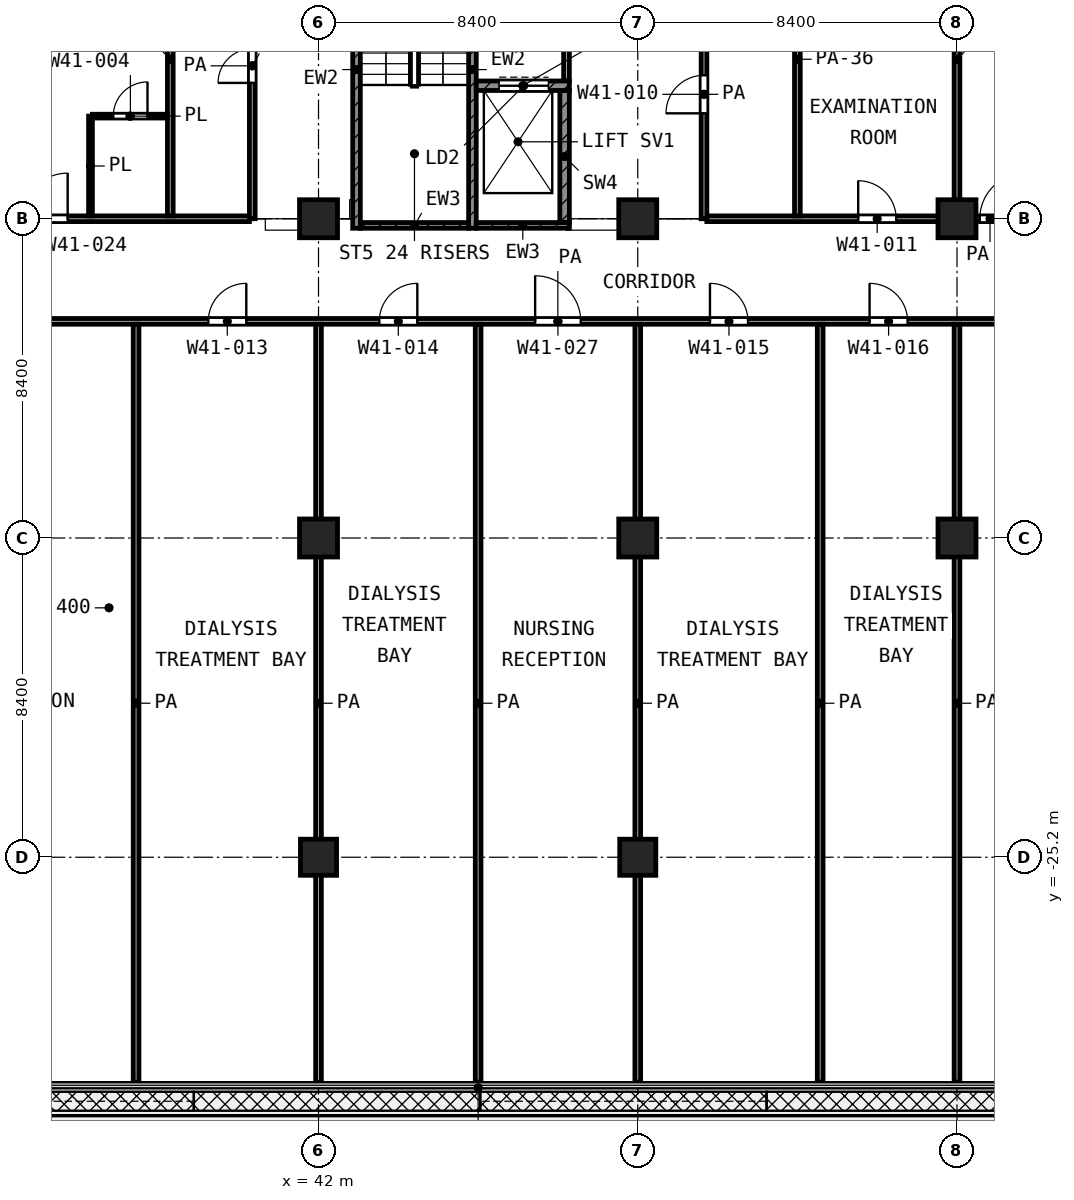
"""IFC4 building model, lengths in metres.
Left out: names, types, materials, properties, quantities, classifications, styles, units other than length and angle.
Written with IfcOpenShell. Run it as: python <this file> out.ifc"""

import sys

from ifc_helpers import new_model, si_unit, direction, frame, frame_2d, origin, origin_2d, place, context, subcontext, project, spatial, rectangle, extrude, element, fill, save


model = new_model("IFC4")
c1 = context("Model", 3, precision=1e-05, world=origin(), true_north=direction((0.0, 1.0)))
c2 = subcontext(c1, "Body", "Model", "MODEL_VIEW")
j1 = project(units=[si_unit("LENGTHUNIT", "METRE"), si_unit("PLANEANGLEUNIT", "RADIAN")], contexts=[c1])
p1 = place(None, origin())
s1 = spatial("IfcSite", under=j1, at=p1, CompositionType="ELEMENT")
p2 = place(p1, origin())
s2 = spatial("IfcBuilding", under=s1, at=p2, CompositionType="ELEMENT")
p3 = place(p2, frame((0.0, 0.0, 200.4)))
s3 = spatial("IfcBuildingStorey", under=s2, at=p3, CompositionType="ELEMENT", Elevation=200.4)
for number, where, z_axis, x_axis in (
    (1, (42.0, -8.4, 0.0), (0.0, 0.0, 1.0), (1.0, 0.0, 0.0)),
    (2, (50.4, -8.4, 0.0), (0.0, 0.0, 1.0), (1.0, 0.0, 0.0)),
    (3, (58.8, -8.4, 0.0), (0.0, 0.0, 1.0), (1.0, 0.0, 0.0)),
    (4, (42.0, -16.8, 0.0), (0.0, 0.0, 1.0), (1.0, 0.0, 0.0)),
    (5, (50.4, -16.8, 0.0), (0.0, 0.0, 1.0), (1.0, 0.0, 0.0)),
    (6, (58.8, -16.8, 0.0), (0.0, 0.0, 1.0), (1.0, 0.0, 0.0)),
):
    element("IfcColumn", number, at=place(p3, frame(where, z_axis=z_axis, x_axis=x_axis)), inside=s3, PredefinedType="COLUMN", context=c2, shape_type="SweptSolid", body=[
        extrude(rectangle(XDim=1.0, YDim=1.0, at=origin_2d()), origin(), (0.0, 0.0, 1.0), 4.2),
    ])
for number, where, z_axis, x_axis in (
    (7, (42.0, -25.2, 0.0), (0.0, 0.0, 1.0), (1.0, 0.0, 0.0)),
    (8, (50.4, -25.2, 0.0), (0.0, 0.0, 1.0), (1.0, 0.0, 0.0)),
):
    element("IfcColumn", number, at=place(p3, frame(where, z_axis=z_axis, x_axis=x_axis)), inside=s3, PredefinedType="COLUMN", context=c2, shape_type="SweptSolid", body=[
        extrude(rectangle(XDim=0.95, YDim=0.95, at=origin_2d()), origin(), (0.0, 0.0, 1.0), 4.2),
    ])
p4 = place(p3, frame((43.0, -8.65, 0.0), z_axis=(0.0, 0.0, 1.0), x_axis=(0.0, 1.0, 0.0)))
e9 = element("IfcWall", 9, at=p4, inside=s3, PredefinedType="SHEAR", context=c2, shape_type="SweptSolid", body=[
    extrude(rectangle(XDim=8.35, YDim=0.2, at=frame_2d((4.175, 0.0))), origin(), (0.0, 0.0, 1.0), 3.6),
])
p5 = place(p4, frame((7.0, 0.0, 0.0)))
e10 = element("IfcOpeningElement", 10, at=p5, cuts=e9, PredefinedType="OPENING", context=c2, shape_type="SweptSolid", body=[
    extrude(rectangle(XDim=1.1, YDim=2.1, at=frame_2d((0.55, 1.05))), frame((0.0, 0.11, 0.0), z_axis=(0.0, -1.0, 0.0), x_axis=(1.0, 0.0, 0.0)), (0.0, 0.0, 1.0), 0.22),
])
p6 = place(p3, frame((46.05, -8.65, 0.0), z_axis=(0.0, 0.0, 1.0), x_axis=(0.0, 1.0, 0.0)))
e11 = element("IfcWall", 11, at=p6, inside=s3, PredefinedType="SHEAR", context=c2, shape_type="SweptSolid", body=[
    extrude(rectangle(XDim=8.35, YDim=0.2, at=frame_2d((4.175, 0.0))), origin(), (0.0, 0.0, 1.0), 3.6),
])
p7 = place(p6, frame((7.0, 0.0, 0.0)))
e12 = element("IfcOpeningElement", 12, at=p7, cuts=e11, PredefinedType="OPENING", context=c2, shape_type="SweptSolid", body=[
    extrude(rectangle(XDim=1.1, YDim=2.1, at=frame_2d((0.55, 1.05))), frame((0.0, 0.11, 0.0), z_axis=(0.0, -1.0, 0.0), x_axis=(1.0, 0.0, 0.0)), (0.0, 0.0, 1.0), 0.22),
])
p8 = place(p3, frame((43.1, -8.575, 0.0), z_axis=(0.0, 0.0, 1.0), x_axis=(1.0, 0.0, 0.0)))
e13 = element("IfcWall", 13, at=p8, inside=s3, PredefinedType="SHEAR", context=c2, shape_type="SweptSolid", body=[
    extrude(rectangle(XDim=2.85, YDim=0.15, at=frame_2d((1.425, 0.0))), origin(), (0.0, 0.0, 1.0), 3.6),
])
p9 = place(p3, frame((46.15, -8.575, 0.0), z_axis=(0.0, 0.0, 1.0), x_axis=(1.0, 0.0, 0.0)))
e14 = element("IfcWall", 14, at=p9, inside=s3, PredefinedType="SHEAR", context=c2, shape_type="SweptSolid", body=[
    extrude(rectangle(XDim=2.45, YDim=0.15, at=frame_2d((1.225, 0.0))), origin(), (0.0, 0.0, 1.0), 3.6),
])
p10 = place(p3, frame((46.15, -4.9, 0.0), z_axis=(0.0, 0.0, 1.0), x_axis=(1.0, 0.0, 0.0)))
e15 = element("IfcWall", 15, at=p10, inside=s3, PredefinedType="SHEAR", context=c2, shape_type="SweptSolid", body=[
    extrude(rectangle(XDim=2.45, YDim=0.25, at=frame_2d((1.225, 0.0))), origin(), (0.0, 0.0, 1.0), 3.6),
])
p11 = place(p10, frame((0.6, 0.0, 0.0)))
e16 = element("IfcOpeningElement", 16, at=p11, cuts=e15, PredefinedType="OPENING", context=c2, shape_type="SweptSolid", body=[
    extrude(rectangle(XDim=1.3, YDim=2.1, at=frame_2d((0.65, 1.05))), frame((0.0, 0.135, 0.0), z_axis=(0.0, -1.0, 0.0), x_axis=(1.0, 0.0, 0.0)), (0.0, 0.0, 1.0), 0.27),
])
p12 = place(p3, frame((48.475, -8.5, 0.0), z_axis=(0.0, 0.0, 1.0), x_axis=(0.0, 1.0, 0.0)))
e17 = element("IfcWall", 17, at=p12, inside=s3, PredefinedType="SHEAR", context=c2, shape_type="SweptSolid", body=[
    extrude(rectangle(XDim=3.475, YDim=0.25, at=frame_2d((1.738, 0.0))), origin(), (0.0, 0.0, 1.0), 3.6),
])
p13 = place(p3, frame((48.525, -4.775, 0.0), z_axis=(0.0, 0.0, 1.0), x_axis=(0.0, 1.0, 0.0)))
e18 = element("IfcWall", 18, at=p13, inside=s3, PredefinedType="PARTITIONING", context=c2, shape_type="SweptSolid", body=[
    extrude(rectangle(XDim=4.325, YDim=0.15, at=frame_2d((2.163, 0.0))), origin(), (0.0, 0.0, 1.0), 3.6),
])
p14 = place(p13, frame((1.625, 0.0, 0.0)))
e19 = element("IfcOpeningElement", 19, at=p14, cuts=e18, PredefinedType="OPENING", context=c2, shape_type="SweptSolid", body=[
    extrude(rectangle(XDim=1.1, YDim=2.1, at=frame_2d((0.55, 1.05))), frame((0.0, 0.085, 0.0), z_axis=(0.0, -1.0, 0.0), x_axis=(1.0, 0.0, 0.0)), (0.0, 0.0, 1.0), 0.17),
])
p15 = place(p3, frame((36.05, -5.7, 0.0), z_axis=(0.0, 0.0, 1.0), x_axis=(1.0, 0.0, 0.0)))
e20 = element("IfcWall", 20, at=p15, inside=s3, PredefinedType="PARTITIONING", context=c2, shape_type="SweptSolid", body=[
    extrude(rectangle(XDim=1.975, YDim=0.1, at=frame_2d((0.987, 0.0))), origin(), (0.0, 0.0, 1.0), 3.6),
])
p16 = place(p15, frame((0.55, 0.0, 0.0)))
e21 = element("IfcOpeningElement", 21, at=p16, cuts=e20, PredefinedType="OPENING", context=c2, shape_type="SweptSolid", body=[
    extrude(rectangle(XDim=0.9, YDim=2.1, at=frame_2d((0.45, 1.05))), frame((0.0, 0.06, 0.0), z_axis=(0.0, -1.0, 0.0), x_axis=(1.0, 0.0, 0.0)), (0.0, 0.0, 1.0), 0.12),
])
p17 = place(p3, frame((36.0, -8.325, 0.0), z_axis=(0.0, 0.0, 1.0), x_axis=(0.0, 1.0, 0.0)))
e22 = element("IfcWall", 22, at=p17, inside=s3, PredefinedType="PARTITIONING", context=c2, shape_type="SweptSolid", body=[
    extrude(rectangle(XDim=2.625, YDim=0.1, at=frame_2d((1.312, 0.0))), origin(), (0.0, 0.0, 1.0), 3.6),
])
p18 = place(p3, frame((29.475, -11.1, 0.0), z_axis=(0.0, 0.0, 1.0), x_axis=(1.0, 0.0, 0.0)))
e23 = element("IfcWall", 23, at=p18, inside=s3, PredefinedType="PARTITIONING", context=c2, shape_type="SweptSolid", body=[
    extrude(rectangle(XDim=37.645, YDim=0.15, at=frame_2d((18.823, 0.0))), origin(), (0.0, 0.0, 1.0), 3.6),
])
p19 = place(p18, frame((3.225, 0.0, 0.0)))
e24 = element("IfcOpeningElement", 24, at=p19, cuts=e23, PredefinedType="OPENING", context=c2, shape_type="SweptSolid", body=[
    extrude(rectangle(XDim=1.2, YDim=2.1, at=frame_2d((0.6, 1.05))), frame((0.0, 0.085, 0.0), z_axis=(0.0, -1.0, 0.0), x_axis=(1.0, 0.0, 0.0)), (0.0, 0.0, 1.0), 0.17),
])
p20 = place(p18, frame((9.625, 0.0, 0.0)))
e25 = element("IfcOpeningElement", 25, at=p20, cuts=e23, PredefinedType="OPENING", context=c2, shape_type="SweptSolid", body=[
    extrude(rectangle(XDim=1.0, YDim=2.1, at=frame_2d((0.5, 1.05))), frame((0.0, 0.085, 0.0), z_axis=(0.0, -1.0, 0.0), x_axis=(1.0, 0.0, 0.0)), (0.0, 0.0, 1.0), 0.17),
])
p21 = place(p18, frame((14.125, 0.0, 0.0)))
e26 = element("IfcOpeningElement", 26, at=p21, cuts=e23, PredefinedType="OPENING", context=c2, shape_type="SweptSolid", body=[
    extrude(rectangle(XDim=1.0, YDim=2.1, at=frame_2d((0.5, 1.05))), frame((0.0, 0.085, 0.0), z_axis=(0.0, -1.0, 0.0), x_axis=(1.0, 0.0, 0.0)), (0.0, 0.0, 1.0), 0.17),
])
p22 = place(p18, frame((18.225, 0.0, 0.0)))
e27 = element("IfcOpeningElement", 27, at=p22, cuts=e23, PredefinedType="OPENING", context=c2, shape_type="SweptSolid", body=[
    extrude(rectangle(XDim=1.2, YDim=2.1, at=frame_2d((0.6, 1.05))), frame((0.0, 0.085, 0.0), z_axis=(0.0, -1.0, 0.0), x_axis=(1.0, 0.0, 0.0)), (0.0, 0.0, 1.0), 0.17),
])
p23 = place(p18, frame((22.825, 0.0, 0.0)))
e28 = element("IfcOpeningElement", 28, at=p23, cuts=e23, PredefinedType="OPENING", context=c2, shape_type="SweptSolid", body=[
    extrude(rectangle(XDim=1.0, YDim=2.1, at=frame_2d((0.5, 1.05))), frame((0.0, 0.085, 0.0), z_axis=(0.0, -1.0, 0.0), x_axis=(1.0, 0.0, 0.0)), (0.0, 0.0, 1.0), 0.17),
])
p24 = place(p18, frame((27.025, 0.0, 0.0)))
e29 = element("IfcOpeningElement", 29, at=p24, cuts=e23, PredefinedType="OPENING", context=c2, shape_type="SweptSolid", body=[
    extrude(rectangle(XDim=1.0, YDim=2.1, at=frame_2d((0.5, 1.05))), frame((0.0, 0.085, 0.0), z_axis=(0.0, -1.0, 0.0), x_axis=(1.0, 0.0, 0.0)), (0.0, 0.0, 1.0), 0.17),
])
p25 = place(p18, frame((32.775, 0.0, 0.0)))
e30 = element("IfcOpeningElement", 30, at=p25, cuts=e23, PredefinedType="OPENING", context=c2, shape_type="SweptSolid", body=[
    extrude(rectangle(XDim=1.5, YDim=2.1, at=frame_2d((0.75, 1.05))), frame((0.0, 0.085, 0.0), z_axis=(0.0, -1.0, 0.0), x_axis=(1.0, 0.0, 0.0)), (0.0, 0.0, 1.0), 0.17),
])
p26 = place(p3, frame((24.9, -8.4, 0.0), z_axis=(0.0, 0.0, 1.0), x_axis=(1.0, 0.0, 0.0)))
e31 = element("IfcWall", 31, at=p26, inside=s3, PredefinedType="PARTITIONING", context=c2, shape_type="SweptSolid", body=[
    extrude(rectangle(XDim=15.282, YDim=0.15, at=frame_2d((7.641, 0.0))), origin(), (0.0, 0.0, 1.0), 3.6),
])
p27 = place(p26, frame((1.75, 0.0, 0.0)))
e32 = element("IfcOpeningElement", 32, at=p27, cuts=e31, PredefinedType="OPENING", context=c2, shape_type="SweptSolid", body=[
    extrude(rectangle(XDim=1.0, YDim=2.1, at=frame_2d((0.5, 1.05))), frame((0.0, 0.085, 0.0), z_axis=(0.0, -1.0, 0.0), x_axis=(1.0, 0.0, 0.0)), (0.0, 0.0, 1.0), 0.17),
])
p28 = place(p26, frame((5.85, 0.0, 0.0)))
e33 = element("IfcOpeningElement", 33, at=p28, cuts=e31, PredefinedType="OPENING", context=c2, shape_type="SweptSolid", body=[
    extrude(rectangle(XDim=1.2, YDim=2.1, at=frame_2d((0.6, 1.05))), frame((0.0, 0.085, 0.0), z_axis=(0.0, -1.0, 0.0), x_axis=(1.0, 0.0, 0.0)), (0.0, 0.0, 1.0), 0.17),
])
p29 = place(p26, frame((9.3, 0.0, 0.0)))
e34 = element("IfcOpeningElement", 34, at=p29, cuts=e31, PredefinedType="OPENING", context=c2, shape_type="SweptSolid", body=[
    extrude(rectangle(XDim=1.2, YDim=2.1, at=frame_2d((0.6, 1.05))), frame((0.0, 0.085, 0.0), z_axis=(0.0, -1.0, 0.0), x_axis=(1.0, 0.0, 0.0)), (0.0, 0.0, 1.0), 0.17),
])
p30 = place(p3, frame((52.218, -8.4, 0.0), z_axis=(0.0, 0.0, 1.0), x_axis=(1.0, 0.0, 0.0)))
e35 = element("IfcWall", 35, at=p30, inside=s3, PredefinedType="PARTITIONING", context=c2, shape_type="SweptSolid", body=[
    extrude(rectangle(XDim=14.902, YDim=0.15, at=frame_2d((7.451, 0.0))), origin(), (0.0, 0.0, 1.0), 3.6),
])
p31 = place(p30, frame((3.982, 0.0, 0.0)))
e36 = element("IfcOpeningElement", 36, at=p31, cuts=e35, PredefinedType="OPENING", context=c2, shape_type="SweptSolid", body=[
    extrude(rectangle(XDim=1.0, YDim=2.1, at=frame_2d((0.5, 1.05))), frame((0.0, 0.085, 0.0), z_axis=(0.0, -1.0, 0.0), x_axis=(1.0, 0.0, 0.0)), (0.0, 0.0, 1.0), 0.17),
])
p32 = place(p30, frame((7.182, 0.0, 0.0)))
e37 = element("IfcOpeningElement", 37, at=p32, cuts=e35, PredefinedType="OPENING", context=c2, shape_type="SweptSolid", body=[
    extrude(rectangle(XDim=1.2, YDim=2.1, at=frame_2d((0.6, 1.05))), frame((0.0, 0.085, 0.0), z_axis=(0.0, -1.0, 0.0), x_axis=(1.0, 0.0, 0.0)), (0.0, 0.0, 1.0), 0.17),
])
p33 = place(p30, frame((12.682, 0.0, 0.0)))
e38 = element("IfcOpeningElement", 38, at=p33, cuts=e35, PredefinedType="OPENING", context=c2, shape_type="SweptSolid", body=[
    extrude(rectangle(XDim=1.0, YDim=2.1, at=frame_2d((0.5, 1.05))), frame((0.0, 0.085, 0.0), z_axis=(0.0, -1.0, 0.0), x_axis=(1.0, 0.0, 0.0)), (0.0, 0.0, 1.0), 0.17),
])
p34 = place(p3, frame((37.2, -31.12, 0.0), z_axis=(0.0, 0.0, 1.0), x_axis=(0.0, 1.0, 0.0)))
e39 = element("IfcWall", 39, at=p34, inside=s3, PredefinedType="PARTITIONING", context=c2, shape_type="SweptSolid", body=[
    extrude(rectangle(XDim=19.945, YDim=0.15, at=frame_2d((9.973, 0.0))), origin(), (0.0, 0.0, 1.0), 3.6),
])
p35 = place(p3, frame((38.1, -8.325, 0.0), z_axis=(0.0, 0.0, 1.0), x_axis=(0.0, 1.0, 0.0)))
e40 = element("IfcWall", 40, at=p35, inside=s3, PredefinedType="PARTITIONING", context=c2, shape_type="SweptSolid", body=[
    extrude(rectangle(XDim=8.245, YDim=0.15, at=frame_2d((4.123, 0.0))), origin(), (0.0, 0.0, 1.0), 2.7),
])
p36 = place(p3, frame((40.257, -8.4, 0.0), z_axis=(0.0, 0.0, 1.0), x_axis=(0.0, 1.0, 0.0)))
e41 = element("IfcWall", 41, at=p36, inside=s3, PredefinedType="PARTITIONING", context=c2, shape_type="SweptSolid", body=[
    extrude(rectangle(XDim=8.048, YDim=0.15, at=frame_2d((4.024, 0.0))), origin(), (0.0, 0.0, 1.0), 3.6),
])
p37 = place(p36, frame((3.574, 0.0, 0.0)))
e42 = element("IfcOpeningElement", 42, at=p37, cuts=e41, PredefinedType="OPENING", context=c2, shape_type="SweptSolid", body=[
    extrude(rectangle(XDim=0.9, YDim=2.1, at=frame_2d((0.45, 1.05))), frame((0.0, 0.085, 0.0), z_axis=(0.0, -1.0, 0.0), x_axis=(1.0, 0.0, 0.0)), (0.0, 0.0, 1.0), 0.17),
])
for number, where, z_axis, x_axis in (
    (43, (42.0, -31.12, 0.0), (0.0, 0.0, 1.0), (0.0, 1.0, 0.0)),
    (44, (46.2, -31.12, 0.0), (0.0, 0.0, 1.0), (0.0, 1.0, 0.0)),
    (45, (50.4, -31.12, 0.0), (0.0, 0.0, 1.0), (0.0, 1.0, 0.0)),
):
    element("IfcWall", number, at=place(p3, frame(where, z_axis=z_axis, x_axis=x_axis)), inside=s3, PredefinedType="PARTITIONING", context=c2, shape_type="SweptSolid", body=[
        extrude(rectangle(XDim=19.945, YDim=0.15, at=frame_2d((9.973, 0.0))), origin(), (0.0, 0.0, 1.0), 3.6),
    ])
p38 = place(p3, frame((52.143, -8.4, 0.0), z_axis=(0.0, 0.0, 1.0), x_axis=(0.0, 1.0, 0.0)))
e46 = element("IfcWall", 46, at=p38, inside=s3, PredefinedType="PARTITIONING", context=c2, shape_type="SweptSolid", body=[
    extrude(rectangle(XDim=6.549, YDim=0.15, at=frame_2d((3.274, 0.0))), origin(), (0.0, 0.0, 1.0), 3.6),
])
p39 = place(p38, frame((2.774, 0.0, 0.0)))
e47 = element("IfcOpeningElement", 47, at=p39, cuts=e46, PredefinedType="OPENING", context=c2, shape_type="SweptSolid", body=[
    extrude(rectangle(XDim=1.0, YDim=2.1, at=frame_2d((0.5, 1.05))), frame((0.0, 0.085, 0.0), z_axis=(0.0, -1.0, 0.0), x_axis=(1.0, 0.0, 0.0)), (0.0, 0.0, 1.0), 0.17),
])
p40 = place(p3, frame((54.6, -8.325, 0.0), z_axis=(0.0, 0.0, 1.0), x_axis=(0.0, 1.0, 0.0)))
e48 = element("IfcWall", 48, at=p40, inside=s3, PredefinedType="PARTITIONING", context=c2, shape_type="SweptSolid", body=[
    extrude(rectangle(XDim=8.245, YDim=0.15, at=frame_2d((4.123, 0.0))), origin(), (0.0, 0.0, 1.0), 2.7),
])
for number, where, z_axis, x_axis in (
    (49, (55.2, -31.12, 0.0), (0.0, 0.0, 1.0), (0.0, 1.0, 0.0)),
    (50, (58.8, -31.12, 0.0), (0.0, 0.0, 1.0), (0.0, 1.0, 0.0)),
):
    element("IfcWall", number, at=place(p3, frame(where, z_axis=z_axis, x_axis=x_axis)), inside=s3, PredefinedType="PARTITIONING", context=c2, shape_type="SweptSolid", body=[
        extrude(rectangle(XDim=19.945, YDim=0.15, at=frame_2d((9.973, 0.0))), origin(), (0.0, 0.0, 1.0), 3.6),
    ])
p41 = place(p3, frame((58.8, -8.325, 0.0), z_axis=(0.0, 0.0, 1.0), x_axis=(0.0, 1.0, 0.0)))
e51 = element("IfcWall", 51, at=p41, inside=s3, PredefinedType="PARTITIONING", context=c2, shape_type="SweptSolid", body=[
    extrude(rectangle(XDim=8.245, YDim=0.15, at=frame_2d((4.123, 0.0))), origin(), (0.0, 0.0, 1.0), 2.7),
])
p42 = place(p11, origin())
e52 = element("IfcDoor", 52, at=p42, inside=s3, OperationType="DOUBLE_DOOR_SLIDING", PredefinedType="DOOR", context=c2, shape_type="SweptSolid", body=[
    extrude(rectangle(XDim=1.3, YDim=2.1, at=frame_2d((0.65, 1.05))), frame((0.0, 0.025, 0.0), z_axis=(0.0, -1.0, 0.0), x_axis=(1.0, 0.0, 0.0)), (0.0, 0.0, 1.0), 0.05),
])
fill(e16, e52)
p43 = place(p29, origin())
e53 = element("IfcDoor", 53, at=p43, inside=s3, OperationType="SINGLE_SWING_RIGHT", PredefinedType="DOOR", context=c2, shape_type="SweptSolid", body=[
    extrude(rectangle(XDim=1.2, YDim=2.1, at=frame_2d((0.6, 1.05))), frame((0.0, 0.025, 0.0), z_axis=(0.0, -1.0, 0.0), x_axis=(1.0, 0.0, 0.0)), (0.0, 0.0, 1.0), 0.05),
])
fill(e34, e53)
p44 = place(p16, origin())
e54 = element("IfcDoor", 54, at=p44, inside=s3, OperationType="SINGLE_SWING_RIGHT", PredefinedType="DOOR", context=c2, shape_type="SweptSolid", body=[
    extrude(rectangle(XDim=0.9, YDim=2.1, at=frame_2d((0.45, 1.05))), frame((0.0, 0.025, 0.0), z_axis=(0.0, -1.0, 0.0), x_axis=(1.0, 0.0, 0.0)), (0.0, 0.0, 1.0), 0.05),
])
fill(e21, e54)
p45 = place(p39, origin())
e55 = element("IfcDoor", 55, at=p45, inside=s3, OperationType="SINGLE_SWING_LEFT", PredefinedType="DOOR", context=c2, shape_type="SweptSolid", body=[
    extrude(rectangle(XDim=1.0, YDim=2.1, at=frame_2d((0.5, 1.05))), frame((0.0, 0.025, 0.0), z_axis=(0.0, -1.0, 0.0), x_axis=(1.0, 0.0, 0.0)), (0.0, 0.0, 1.0), 0.05),
])
fill(e47, e55)
p46 = place(p31, origin())
e56 = element("IfcDoor", 56, at=p46, inside=s3, OperationType="SINGLE_SWING_LEFT", PredefinedType="DOOR", context=c2, shape_type="SweptSolid", body=[
    extrude(rectangle(XDim=1.0, YDim=2.1, at=frame_2d((0.5, 1.05))), frame((0.0, 0.025, 0.0), z_axis=(0.0, -1.0, 0.0), x_axis=(1.0, 0.0, 0.0)), (0.0, 0.0, 1.0), 0.05),
])
fill(e36, e56)
p47 = place(p32, origin())
e57 = element("IfcDoor", 57, at=p47, inside=s3, OperationType="SINGLE_SWING_RIGHT", PredefinedType="DOOR", context=c2, shape_type="SweptSolid", body=[
    extrude(rectangle(XDim=1.2, YDim=2.1, at=frame_2d((0.6, 1.05))), frame((0.0, 0.025, 0.0), z_axis=(0.0, -1.0, 0.0), x_axis=(1.0, 0.0, 0.0)), (0.0, 0.0, 1.0), 0.05),
])
fill(e37, e57)
p48 = place(p20, origin())
e58 = element("IfcDoor", 58, at=p48, inside=s3, OperationType="SINGLE_SWING_RIGHT", PredefinedType="DOOR", context=c2, shape_type="SweptSolid", body=[
    extrude(rectangle(XDim=1.0, YDim=2.1, at=frame_2d((0.5, 1.05))), frame((0.0, 0.025, 0.0), z_axis=(0.0, -1.0, 0.0), x_axis=(1.0, 0.0, 0.0)), (0.0, 0.0, 1.0), 0.05),
])
fill(e25, e58)
p49 = place(p21, origin())
e59 = element("IfcDoor", 59, at=p49, inside=s3, OperationType="SINGLE_SWING_RIGHT", PredefinedType="DOOR", context=c2, shape_type="SweptSolid", body=[
    extrude(rectangle(XDim=1.0, YDim=2.1, at=frame_2d((0.5, 1.05))), frame((0.0, 0.025, 0.0), z_axis=(0.0, -1.0, 0.0), x_axis=(1.0, 0.0, 0.0)), (0.0, 0.0, 1.0), 0.05),
])
fill(e26, e59)
p50 = place(p22, origin())
e60 = element("IfcDoor", 60, at=p50, inside=s3, OperationType="SINGLE_SWING_LEFT", PredefinedType="DOOR", context=c2, shape_type="SweptSolid", body=[
    extrude(rectangle(XDim=1.2, YDim=2.1, at=frame_2d((0.6, 1.05))), frame((0.0, 0.025, 0.0), z_axis=(0.0, -1.0, 0.0), x_axis=(1.0, 0.0, 0.0)), (0.0, 0.0, 1.0), 0.05),
])
fill(e27, e60)
p51 = place(p23, origin())
e61 = element("IfcDoor", 61, at=p51, inside=s3, OperationType="SINGLE_SWING_LEFT", PredefinedType="DOOR", context=c2, shape_type="SweptSolid", body=[
    extrude(rectangle(XDim=1.0, YDim=2.1, at=frame_2d((0.5, 1.05))), frame((0.0, 0.025, 0.0), z_axis=(0.0, -1.0, 0.0), x_axis=(1.0, 0.0, 0.0)), (0.0, 0.0, 1.0), 0.05),
])
fill(e28, e61)
p52 = place(p24, origin())
e62 = element("IfcDoor", 62, at=p52, inside=s3, OperationType="SINGLE_SWING_LEFT", PredefinedType="DOOR", context=c2, shape_type="SweptSolid", body=[
    extrude(rectangle(XDim=1.0, YDim=2.1, at=frame_2d((0.5, 1.05))), frame((0.0, 0.025, 0.0), z_axis=(0.0, -1.0, 0.0), x_axis=(1.0, 0.0, 0.0)), (0.0, 0.0, 1.0), 0.05),
])
fill(e29, e62)
p53 = place(p37, origin())
e63 = element("IfcDoor", 63, at=p53, inside=s3, OperationType="SINGLE_SWING_LEFT", PredefinedType="DOOR", context=c2, shape_type="SweptSolid", body=[
    extrude(rectangle(XDim=0.9, YDim=2.1, at=frame_2d((0.45, 1.05))), frame((0.0, 0.025, 0.0), z_axis=(0.0, -1.0, 0.0), x_axis=(1.0, 0.0, 0.0)), (0.0, 0.0, 1.0), 0.05),
])
fill(e42, e63)
save(model, sys.argv[1])
